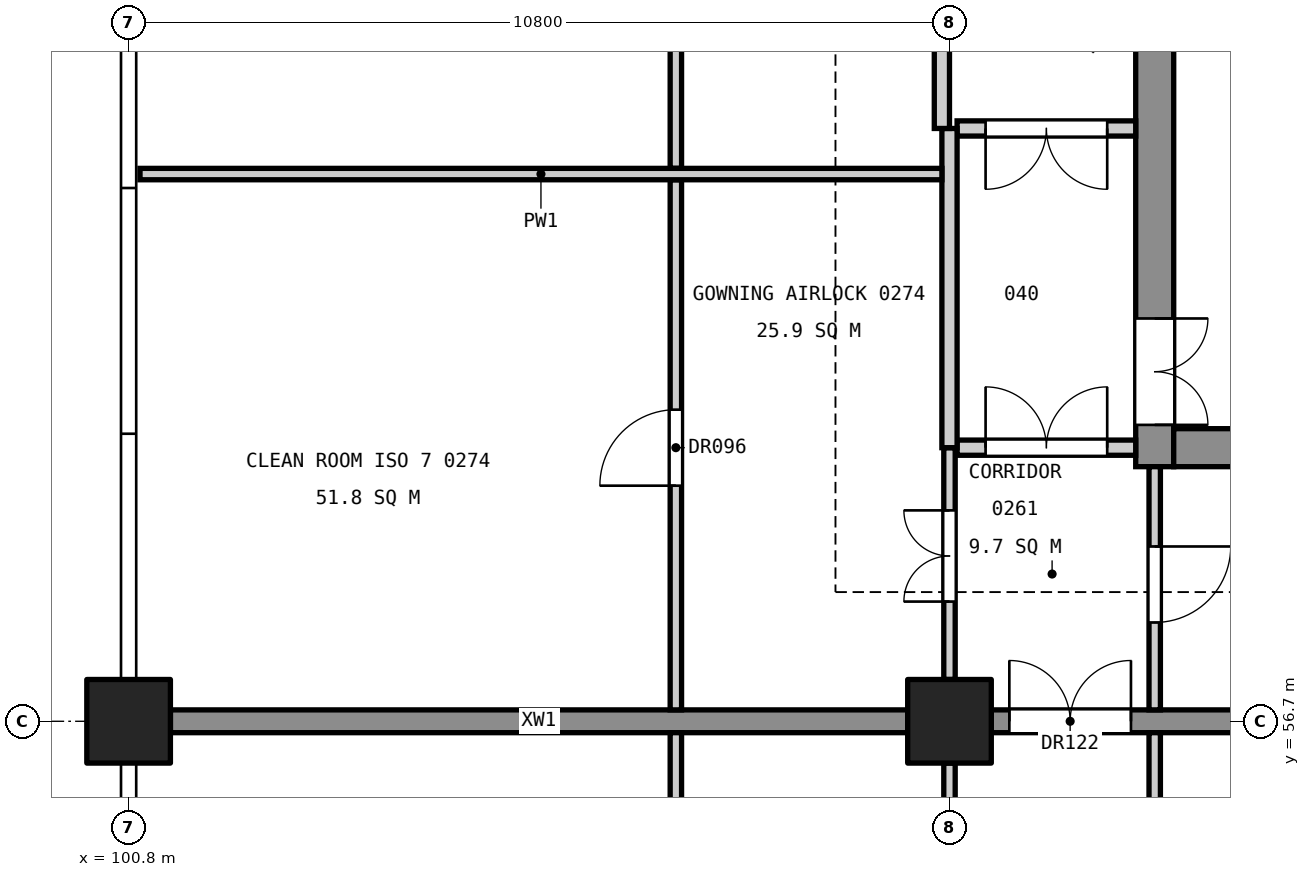
"""IFC4 building model, lengths in metres.
Left out: names, types, materials, properties, quantities, classifications, styles, units other than length and angle.
Written with IfcOpenShell. Run it as: python <this file> out.ifc"""

import sys

from ifc_helpers import new_model, si_unit, direction, frame, frame_2d, origin, origin_2d, place, context, subcontext, project, spatial, rectangle, extrude, element, fill, save


model = new_model("IFC4")
c1 = context("Model", 3, precision=1e-05, world=origin(), true_north=direction((0.0, 1.0)))
c2 = subcontext(c1, "Body", "Model", "MODEL_VIEW")
j1 = project(units=[si_unit("LENGTHUNIT", "METRE"), si_unit("PLANEANGLEUNIT", "RADIAN")], contexts=[c1])
p1 = place(None, origin())
s1 = spatial("IfcSite", under=j1, at=p1, CompositionType="ELEMENT")
p2 = place(p1, origin())
s2 = spatial("IfcBuilding", under=s1, at=p2, CompositionType="ELEMENT")
p3 = place(p2, frame((0.0, 0.0, 11.4)))
s3 = spatial("IfcBuildingStorey", under=s2, at=p3, CompositionType="ELEMENT", Elevation=11.4)
for number, where, z_axis, x_axis in (
    (1, (111.6, 56.7, 0.0), (0.0, 0.0, 1.0), (1.0, 0.0, 0.0)),
    (2, (100.8, 56.7, 0.0), (0.0, 0.0, 1.0), (1.0, 0.0, 0.0)),
):
    element("IfcColumn", number, at=place(p3, frame(where, z_axis=z_axis, x_axis=x_axis)), inside=s3, PredefinedType="COLUMN", context=c2, shape_type="SweptSolid", body=[
        extrude(rectangle(XDim=1.1, YDim=1.1, at=origin_2d()), origin(), (0.0, 0.0, 1.0), 5.4),
    ])
p4 = place(p3, frame((114.3, 60.05, 0.0), z_axis=(0.0, 0.0, 1.0), x_axis=(0.0, 1.0, 0.0)))
e3 = element("IfcWall", 3, at=p4, inside=s3, PredefinedType="SHEAR", context=c2, shape_type="SweptSolid", body=[
    extrude(rectangle(XDim=14.9, YDim=0.5, at=frame_2d((7.45, 0.0))), origin(), (0.0, 0.0, 1.0), 5.1),
])
p5 = place(p4, frame((0.55, 0.0, 0.0)))
e4 = element("IfcOpeningElement", 4, at=p5, cuts=e3, PredefinedType="OPENING", context=c2, shape_type="SweptSolid", body=[
    extrude(rectangle(XDim=1.4, YDim=2.1, at=frame_2d((0.7, 1.05))), frame((0.0, 0.26, 0.0), z_axis=(0.0, -1.0, 0.0), x_axis=(1.0, 0.0, 0.0)), (0.0, 0.0, 1.0), 0.52),
])
p6 = place(p4, frame((8.85, 0.0, 0.0)))
e5 = element("IfcOpeningElement", 5, at=p6, cuts=e3, PredefinedType="OPENING", context=c2, shape_type="SweptSolid", body=[
    extrude(rectangle(XDim=1.1, YDim=2.1, at=frame_2d((0.55, 1.05))), frame((0.0, 0.26, 0.0), z_axis=(0.0, -1.0, 0.0), x_axis=(1.0, 0.0, 0.0)), (0.0, 0.0, 1.0), 0.52),
])
p7 = place(p4, frame((11.4, 0.0, 0.0)))
e6 = element("IfcOpeningElement", 6, at=p7, cuts=e3, PredefinedType="OPENING", context=c2, shape_type="SweptSolid", body=[
    extrude(rectangle(XDim=1.1, YDim=2.1, at=frame_2d((0.55, 1.05))), frame((0.0, 0.26, 0.0), z_axis=(0.0, -1.0, 0.0), x_axis=(1.0, 0.0, 0.0)), (0.0, 0.0, 1.0), 0.52),
])
p8 = place(p3, frame((118.55, 60.3, 0.0), z_axis=(0.0, 0.0, 1.0), x_axis=(-1.0, 0.0, 0.0)))
e7 = element("IfcWall", 7, at=p8, inside=s3, PredefinedType="SHEAR", context=c2, shape_type="SweptSolid", body=[
    extrude(rectangle(XDim=4.0, YDim=0.5, at=frame_2d((2.0, 0.0))), origin(), (0.0, 0.0, 1.0), 5.1),
])
p9 = place(p3, frame((118.25, 56.7, 0.0), z_axis=(0.0, 0.0, 1.0), x_axis=(-1.0, 0.0, 0.0)))
e8 = element("IfcWall", 8, at=p9, inside=s3, PredefinedType="SHEAR", context=c2, shape_type="SweptSolid", body=[
    extrude(rectangle(XDim=6.1, YDim=0.3, at=frame_2d((3.05, 0.0))), origin(), (0.0, 0.0, 1.0), 5.1),
])
p10 = place(p9, frame((4.262, 0.0, 0.0)))
e9 = element("IfcOpeningElement", 9, at=p10, cuts=e8, PredefinedType="OPENING", context=c2, shape_type="SweptSolid", body=[
    extrude(rectangle(XDim=1.6, YDim=2.1, at=frame_2d((0.8, 1.05))), frame((0.0, 0.16, 0.0), z_axis=(0.0, -1.0, 0.0), x_axis=(1.0, 0.0, 0.0)), (0.0, 0.0, 1.0), 0.32),
])
p11 = place(p3, frame((111.05, 56.7, 0.0), z_axis=(0.0, 0.0, 1.0), x_axis=(-1.0, 0.0, 0.0)))
e10 = element("IfcWall", 10, at=p11, inside=s3, PredefinedType="SHEAR", context=c2, shape_type="SweptSolid", body=[
    extrude(rectangle(XDim=9.7, YDim=0.3, at=frame_2d((4.85, 0.0))), origin(), (0.0, 0.0, 1.0), 5.1),
])
p12 = place(p3, frame((114.3, 46.15, 0.0), z_axis=(0.0, 0.0, 1.0), x_axis=(0.0, 1.0, 0.0)))
e11 = element("IfcWall", 11, at=p12, inside=s3, PredefinedType="PARTITIONING", context=c2, shape_type="SweptSolid", body=[
    extrude(rectangle(XDim=10.4, YDim=0.15, at=frame_2d((5.2, 0.0))), origin(), (0.0, 0.0, 1.0), 4.0),
])
p13 = place(p12, frame((4.65, 0.0, 0.0)))
e12 = element("IfcOpeningElement", 12, at=p13, cuts=e11, PredefinedType="OPENING", context=c2, shape_type="SweptSolid", body=[
    extrude(rectangle(XDim=1.0, YDim=2.1, at=frame_2d((0.5, 1.05))), frame((0.0, 0.085, 0.0), z_axis=(0.0, -1.0, 0.0), x_axis=(1.0, 0.0, 0.0)), (0.0, 0.0, 1.0), 0.17),
])
p14 = place(p12, frame((1.05, 0.0, 0.0)))
e13 = element("IfcOpeningElement", 13, at=p14, cuts=e11, PredefinedType="OPENING", context=c2, shape_type="SweptSolid", body=[
    extrude(rectangle(XDim=1.0, YDim=2.1, at=frame_2d((0.5, 1.05))), frame((0.0, 0.085, 0.0), z_axis=(0.0, -1.0, 0.0), x_axis=(1.0, 0.0, 0.0)), (0.0, 0.0, 1.0), 0.17),
])
p15 = place(p12, frame((8.25, 0.0, 0.0)))
e14 = element("IfcOpeningElement", 14, at=p15, cuts=e11, PredefinedType="OPENING", context=c2, shape_type="SweptSolid", body=[
    extrude(rectangle(XDim=1.0, YDim=2.1, at=frame_2d((0.5, 1.05))), frame((0.0, 0.085, 0.0), z_axis=(0.0, -1.0, 0.0), x_axis=(1.0, 0.0, 0.0)), (0.0, 0.0, 1.0), 0.17),
])
p16 = place(p3, frame((114.3, 56.85, 0.0), z_axis=(0.0, 0.0, 1.0), x_axis=(0.0, 1.0, 0.0)))
e15 = element("IfcWall", 15, at=p16, inside=s3, PredefinedType="PARTITIONING", context=c2, shape_type="SweptSolid", body=[
    extrude(rectangle(XDim=3.2, YDim=0.15, at=frame_2d((1.6, 0.0))), origin(), (0.0, 0.0, 1.0), 4.0),
])
p17 = place(p16, frame((1.15, 0.0, 0.0)))
e16 = element("IfcOpeningElement", 16, at=p17, cuts=e15, PredefinedType="OPENING", context=c2, shape_type="SweptSolid", body=[
    extrude(rectangle(XDim=1.0, YDim=2.1, at=frame_2d((0.5, 1.05))), frame((0.0, 0.085, 0.0), z_axis=(0.0, -1.0, 0.0), x_axis=(1.0, 0.0, 0.0)), (0.0, 0.0, 1.0), 0.17),
])
p18 = place(p3, frame((114.05, 60.3, 0.0), z_axis=(0.0, 0.0, 1.0), x_axis=(-1.0, 0.0, 0.0)))
e17 = element("IfcWall", 17, at=p18, inside=s3, PredefinedType="PARTITIONING", context=c2, shape_type="SweptSolid", body=[
    extrude(rectangle(XDim=2.35, YDim=0.2, at=frame_2d((1.175, 0.0))), origin(), (0.0, 0.0, 1.0), 4.3),
])
p19 = place(p18, frame((0.375, 0.0, 0.0)))
e18 = element("IfcOpeningElement", 18, at=p19, cuts=e17, PredefinedType="OPENING", context=c2, shape_type="SweptSolid", body=[
    extrude(rectangle(XDim=1.6, YDim=2.1, at=frame_2d((0.8, 1.05))), frame((0.0, 0.11, 0.0), z_axis=(0.0, -1.0, 0.0), x_axis=(1.0, 0.0, 0.0)), (0.0, 0.0, 1.0), 0.22),
])
p20 = place(p3, frame((114.05, 64.5, 0.0), z_axis=(0.0, 0.0, 1.0), x_axis=(-1.0, 0.0, 0.0)))
e19 = element("IfcWall", 19, at=p20, inside=s3, PredefinedType="PARTITIONING", context=c2, shape_type="SweptSolid", body=[
    extrude(rectangle(XDim=2.35, YDim=0.2, at=frame_2d((1.175, 0.0))), origin(), (0.0, 0.0, 1.0), 4.0),
])
p21 = place(p20, frame((0.375, 0.0, 0.0)))
e20 = element("IfcOpeningElement", 20, at=p21, cuts=e19, PredefinedType="OPENING", context=c2, shape_type="SweptSolid", body=[
    extrude(rectangle(XDim=1.6, YDim=2.1, at=frame_2d((0.8, 1.05))), frame((0.0, 0.11, 0.0), z_axis=(0.0, -1.0, 0.0), x_axis=(1.0, 0.0, 0.0)), (0.0, 0.0, 1.0), 0.22),
])
p22 = place(p3, frame((111.6, 46.45, 0.0), z_axis=(0.0, 0.0, 1.0), x_axis=(0.0, 1.0, 0.0)))
e21 = element("IfcWall", 21, at=p22, inside=s3, PredefinedType="PARTITIONING", context=c2, shape_type="SweptSolid", body=[
    extrude(rectangle(XDim=9.7, YDim=0.15, at=frame_2d((4.85, 0.0))), origin(), (0.0, 0.0, 1.0), 4.0),
])
p23 = place(p22, frame((1.025, 0.0, 0.0)))
e22 = element("IfcOpeningElement", 22, at=p23, cuts=e21, PredefinedType="OPENING", context=c2, shape_type="SweptSolid", body=[
    extrude(rectangle(XDim=1.2, YDim=2.1, at=frame_2d((0.6, 1.05))), frame((0.0, 0.085, 0.0), z_axis=(0.0, -1.0, 0.0), x_axis=(1.0, 0.0, 0.0)), (0.0, 0.0, 1.0), 0.17),
])
p24 = place(p22, frame((7.675, 0.0, 0.0)))
e23 = element("IfcOpeningElement", 23, at=p24, cuts=e21, PredefinedType="OPENING", context=c2, shape_type="SweptSolid", body=[
    extrude(rectangle(XDim=1.2, YDim=2.1, at=frame_2d((0.6, 1.05))), frame((0.0, 0.085, 0.0), z_axis=(0.0, -1.0, 0.0), x_axis=(1.0, 0.0, 0.0)), (0.0, 0.0, 1.0), 0.17),
])
p25 = place(p22, frame((4.25, 0.0, 0.0)))
e24 = element("IfcOpeningElement", 24, at=p25, cuts=e21, PredefinedType="OPENING", context=c2, shape_type="SweptSolid", body=[
    extrude(rectangle(XDim=1.2, YDim=2.1, at=frame_2d((0.6, 1.05))), frame((0.0, 0.085, 0.0), z_axis=(0.0, -1.0, 0.0), x_axis=(1.0, 0.0, 0.0)), (0.0, 0.0, 1.0), 0.17),
])
p26 = place(p3, frame((111.6, 57.25, 0.0), z_axis=(0.0, 0.0, 1.0), x_axis=(0.0, 1.0, 0.0)))
e25 = element("IfcWall", 25, at=p26, inside=s3, PredefinedType="PARTITIONING", context=c2, shape_type="SweptSolid", body=[
    extrude(rectangle(XDim=3.05, YDim=0.15, at=frame_2d((1.525, 0.0))), origin(), (0.0, 0.0, 1.0), 4.0),
])
p27 = place(p26, frame((1.025, 0.0, 0.0)))
e26 = element("IfcOpeningElement", 26, at=p27, cuts=e25, PredefinedType="OPENING", context=c2, shape_type="SweptSolid", body=[
    extrude(rectangle(XDim=1.2, YDim=2.1, at=frame_2d((0.6, 1.05))), frame((0.0, 0.085, 0.0), z_axis=(0.0, -1.0, 0.0), x_axis=(1.0, 0.0, 0.0)), (0.0, 0.0, 1.0), 0.17),
])
p28 = place(p3, frame((111.6, 60.3, 0.0), z_axis=(0.0, 0.0, 1.0), x_axis=(0.0, 1.0, 0.0)))
e27 = element("IfcWall", 27, at=p28, inside=s3, PredefinedType="PARTITIONING", context=c2, shape_type="SweptSolid", body=[
    extrude(rectangle(XDim=4.2, YDim=0.2, at=frame_2d((2.1, 0.0))), origin(), (0.0, 0.0, 1.0), 4.0),
])
p29 = place(p3, frame((111.5, 64.5, 0.0), z_axis=(0.0, 0.0, 1.0), x_axis=(0.0, 1.0, 0.0)))
e28 = element("IfcWall", 28, at=p29, inside=s3, PredefinedType="PARTITIONING", context=c2, shape_type="SweptSolid", body=[
    extrude(rectangle(XDim=2.45, YDim=0.2, at=frame_2d((1.225, 0.0))), origin(), (0.0, 0.0, 1.0), 4.0),
])
p30 = place(p3, frame((108.0, 53.175, 0.0), z_axis=(0.0, 0.0, 1.0), x_axis=(0.0, 1.0, 0.0)))
e29 = element("IfcWall", 29, at=p30, inside=s3, PredefinedType="PARTITIONING", context=c2, shape_type="SweptSolid", body=[
    extrude(rectangle(XDim=3.375, YDim=0.15, at=frame_2d((1.688, 0.0))), origin(), (0.0, 0.0, 1.0), 4.0),
])
p31 = place(p30, frame((1.225, 0.0, 0.0)))
e30 = element("IfcOpeningElement", 30, at=p31, cuts=e29, PredefinedType="OPENING", context=c2, shape_type="SweptSolid", body=[
    extrude(rectangle(XDim=1.0, YDim=2.1, at=frame_2d((0.5, 1.05))), frame((0.0, 0.085, 0.0), z_axis=(0.0, -1.0, 0.0), x_axis=(1.0, 0.0, 0.0)), (0.0, 0.0, 1.0), 0.17),
])
p32 = place(p3, frame((108.0, 56.85, 0.0), z_axis=(0.0, 0.0, 1.0), x_axis=(0.0, 1.0, 0.0)))
e31 = element("IfcWall", 31, at=p32, inside=s3, PredefinedType="PARTITIONING", context=c2, shape_type="SweptSolid", body=[
    extrude(rectangle(XDim=6.975, YDim=0.15, at=frame_2d((3.487, 0.0))), origin(), (0.0, 0.0, 1.0), 4.0),
])
p33 = place(p32, frame((2.95, 0.0, 0.0)))
e32 = element("IfcOpeningElement", 32, at=p33, cuts=e31, PredefinedType="OPENING", context=c2, shape_type="SweptSolid", body=[
    extrude(rectangle(XDim=1.0, YDim=2.1, at=frame_2d((0.5, 1.05))), frame((0.0, 0.085, 0.0), z_axis=(0.0, -1.0, 0.0), x_axis=(1.0, 0.0, 0.0)), (0.0, 0.0, 1.0), 0.17),
])
p34 = place(p3, frame((108.0, 63.975, 0.0), z_axis=(0.0, 0.0, 1.0), x_axis=(0.0, 1.0, 0.0)))
e33 = element("IfcWall", 33, at=p34, inside=s3, PredefinedType="PARTITIONING", context=c2, shape_type="SweptSolid", body=[
    extrude(rectangle(XDim=14.175, YDim=0.15, at=frame_2d((7.087, 0.0))), origin(), (0.0, 0.0, 1.0), 4.0),
])
p35 = place(p34, frame((6.625, 0.0, 0.0)))
e34 = element("IfcOpeningElement", 34, at=p35, cuts=e33, PredefinedType="OPENING", context=c2, shape_type="SweptSolid", body=[
    extrude(rectangle(XDim=1.0, YDim=2.1, at=frame_2d((0.5, 1.05))), frame((0.0, 0.085, 0.0), z_axis=(0.0, -1.0, 0.0), x_axis=(1.0, 0.0, 0.0)), (0.0, 0.0, 1.0), 0.17),
])
p36 = place(p3, frame((111.5, 63.9, 0.0), z_axis=(0.0, 0.0, 1.0), x_axis=(-1.0, 0.0, 0.0)))
e35 = element("IfcWall", 35, at=p36, inside=s3, PredefinedType="PARTITIONING", context=c2, shape_type="SweptSolid", body=[
    extrude(rectangle(XDim=10.55, YDim=0.15, at=frame_2d((5.275, 0.0))), origin(), (0.0, 0.0, 1.0), 4.3),
])
p37 = place(p5, frame((1.4, 0.0, 0.0), z_axis=(0.0, 0.0, 1.0), x_axis=(-1.0, 0.0, 0.0)))
e36 = element("IfcDoor", 36, at=p37, inside=s3, OperationType="DOUBLE_DOOR_SINGLE_SWING", PredefinedType="DOOR", context=c2, shape_type="SweptSolid", body=[
    extrude(rectangle(XDim=1.4, YDim=2.1, at=frame_2d((0.7, 1.05))), frame((0.0, 0.025, 0.0), z_axis=(0.0, -1.0, 0.0), x_axis=(1.0, 0.0, 0.0)), (0.0, 0.0, 1.0), 0.05),
])
fill(e4, e36)
p38 = place(p33, origin())
e37 = element("IfcDoor", 37, at=p38, inside=s3, OperationType="SINGLE_SWING_LEFT", PredefinedType="DOOR", context=c2, shape_type="SweptSolid", body=[
    extrude(rectangle(XDim=1.0, YDim=2.1, at=frame_2d((0.5, 1.05))), frame((0.0, 0.025, 0.0), z_axis=(0.0, -1.0, 0.0), x_axis=(1.0, 0.0, 0.0)), (0.0, 0.0, 1.0), 0.05),
])
fill(e32, e37)
p39 = place(p27, origin())
e38 = element("IfcDoor", 38, at=p39, inside=s3, OperationType="DOUBLE_DOOR_SINGLE_SWING", PredefinedType="DOOR", context=c2, shape_type="SweptSolid", body=[
    extrude(rectangle(XDim=1.2, YDim=2.1, at=frame_2d((0.6, 1.05))), frame((0.0, 0.025, 0.0), z_axis=(0.0, -1.0, 0.0), x_axis=(1.0, 0.0, 0.0)), (0.0, 0.0, 1.0), 0.05),
])
fill(e26, e38)
p40 = place(p17, frame((1.0, 0.0, 0.0), z_axis=(0.0, 0.0, 1.0), x_axis=(-1.0, 0.0, 0.0)))
e39 = element("IfcDoor", 39, at=p40, inside=s3, OperationType="SINGLE_SWING_LEFT", PredefinedType="DOOR", context=c2, shape_type="SweptSolid", body=[
    extrude(rectangle(XDim=1.0, YDim=2.1, at=frame_2d((0.5, 1.05))), frame((0.0, 0.025, 0.0), z_axis=(0.0, -1.0, 0.0), x_axis=(1.0, 0.0, 0.0)), (0.0, 0.0, 1.0), 0.05),
])
fill(e16, e39)
p41 = place(p19, frame((1.6, 0.0, 0.0), z_axis=(0.0, 0.0, 1.0), x_axis=(-1.0, 0.0, 0.0)))
e40 = element("IfcDoor", 40, at=p41, inside=s3, OperationType="DOUBLE_DOOR_SINGLE_SWING", PredefinedType="DOOR", context=c2, shape_type="SweptSolid", body=[
    extrude(rectangle(XDim=1.6, YDim=2.1, at=frame_2d((0.8, 1.05))), frame((0.0, 0.025, 0.0), z_axis=(0.0, -1.0, 0.0), x_axis=(1.0, 0.0, 0.0)), (0.0, 0.0, 1.0), 0.05),
])
fill(e18, e40)
p42 = place(p21, origin())
e41 = element("IfcDoor", 41, at=p42, inside=s3, OperationType="DOUBLE_DOOR_SINGLE_SWING", PredefinedType="DOOR", context=c2, shape_type="SweptSolid", body=[
    extrude(rectangle(XDim=1.6, YDim=2.1, at=frame_2d((0.8, 1.05))), frame((0.0, 0.025, 0.0), z_axis=(0.0, -1.0, 0.0), x_axis=(1.0, 0.0, 0.0)), (0.0, 0.0, 1.0), 0.05),
])
fill(e20, e41)
p43 = place(p10, frame((1.6, 0.0, 0.0), z_axis=(0.0, 0.0, 1.0), x_axis=(-1.0, 0.0, 0.0)))
e42 = element("IfcDoor", 42, at=p43, inside=s3, OperationType="DOUBLE_DOOR_SINGLE_SWING", PredefinedType="DOOR", context=c2, shape_type="SweptSolid", body=[
    extrude(rectangle(XDim=1.6, YDim=2.1, at=frame_2d((0.8, 1.05))), frame((0.0, 0.025, 0.0), z_axis=(0.0, -1.0, 0.0), x_axis=(1.0, 0.0, 0.0)), (0.0, 0.0, 1.0), 0.05),
])
fill(e9, e42)
save(model, sys.argv[1])
